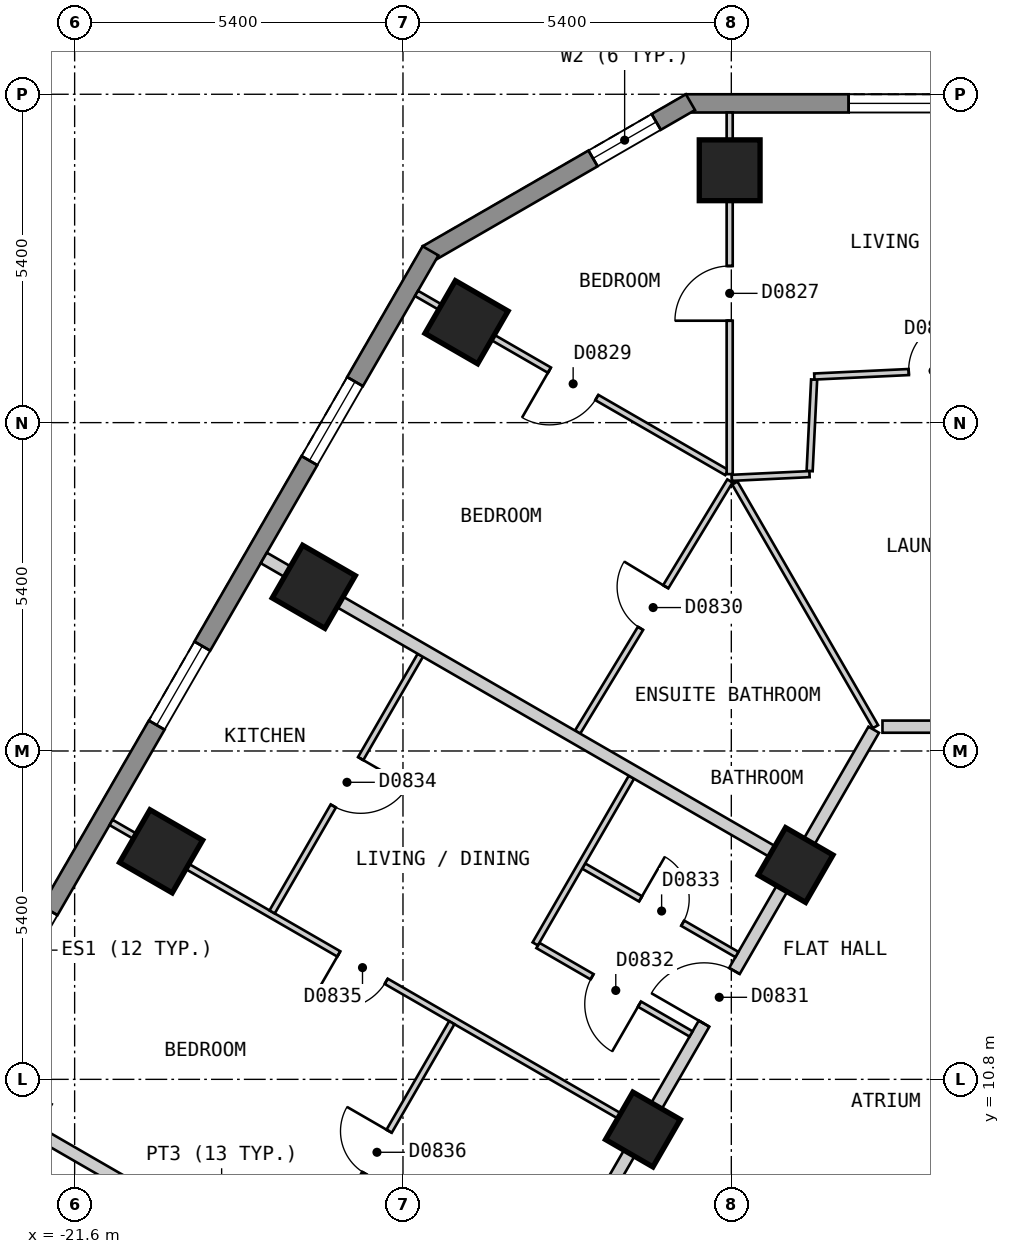
"""IFC4 building model, lengths in metres.
Left out: names, types, materials, properties, quantities, classifications, styles, units other than length and angle.
Written with IfcOpenShell. Run it as: python <this file> out.ifc"""

import sys

from ifc_helpers import new_model, si_unit, direction, frame, frame_2d, origin, origin_2d, place, context, subcontext, project, spatial, polyline, rectangle, outline, extrude, element, fill, save


model = new_model("IFC4")
c1 = context("Model", 3, precision=1e-05, world=origin(), true_north=direction((0.0, 1.0)))
c2 = subcontext(c1, "Body", "Model", "MODEL_VIEW")
j1 = project(units=[si_unit("LENGTHUNIT", "METRE"), si_unit("PLANEANGLEUNIT", "RADIAN")], contexts=[c1])
p1 = place(None, origin())
s1 = spatial("IfcSite", under=j1, at=p1, CompositionType="ELEMENT")
p2 = place(p1, origin())
s2 = spatial("IfcBuilding", under=s1, at=p2, CompositionType="ELEMENT")
p3 = place(p2, frame((0.0, 0.0, 84.0)))
s3 = spatial("IfcBuildingStorey", under=s2, at=p3, CompositionType="ELEMENT", Elevation=84.0)
for number, where, z_axis, x_axis in (
    (1, (-10.827, 25.75, 0.0), (0.0, 0.0, 1.0), (-1.0, 0.0, 0.0)),
    (2, (-15.155, 23.251, 0.0), (0.0, 0.0, 1.0), (-0.5, -0.866, 0.0)),
    (3, (-17.667, 18.9, 0.0), (0.0, 0.0, 1.0), (-0.5, -0.866, 0.0)),
    (4, (-20.178, 14.55, 0.0), (0.0, 0.0, 1.0), (-0.5, -0.866, 0.0)),
):
    element("IfcColumn", number, at=place(p3, frame(where, z_axis=z_axis, x_axis=x_axis)), inside=s3, PredefinedType="COLUMN", context=c2, shape_type="SweptSolid", body=[
        extrude(rectangle(XDim=1.0, YDim=1.0, at=origin_2d()), origin(), (0.0, 0.0, 1.0), 3.0),
    ])
for number, where, z_axis, x_axis in (
    (5, (-9.743, 14.325, 0.0), (0.0, 0.0, 1.0), (-0.5, -0.866, 0.0)),
    (6, (-12.254, 9.975, 0.0), (0.0, 0.0, 1.0), (-0.5, -0.866, 0.0)),
):
    element("IfcColumn", number, at=place(p3, frame(where, z_axis=z_axis, x_axis=x_axis)), inside=s3, PredefinedType="COLUMN", context=c2, shape_type="SweptSolid", body=[
        extrude(rectangle(XDim=0.9, YDim=0.9, at=origin_2d()), origin(), (0.0, 0.0, 1.0), 3.0),
    ])
p4 = place(p3, frame((11.547, 26.85, 0.0), z_axis=(0.0, 0.0, 1.0), x_axis=(-1.0, 0.0, 0.0)))
e7 = element("IfcWall", 7, at=p4, inside=s3, PredefinedType="SOLIDWALL", context=c2, shape_type="SweptSolid", body=[
    extrude(outline(polyline([(0.0, -0.15), (23.094, -0.15), (23.014, 0.15), (0.08, 0.15), (0.0, -0.15)])), origin(), (0.0, 0.0, 1.0), 2.7),
])
p5 = place(p4, frame((2.678, 0.0, 0.15)))
e8 = element("IfcOpeningElement", 8, at=p5, cuts=e7, PredefinedType="OPENING", context=c2, shape_type="SweptSolid", body=[
    extrude(rectangle(XDim=1.5, YDim=2.1, at=frame_2d((0.75, 1.05))), frame((0.0, 0.16, 0.0), z_axis=(0.0, -1.0, 0.0), x_axis=(1.0, 0.0, 0.0)), (0.0, 0.0, 1.0), 0.32),
])
p6 = place(p4, frame((8.092, 0.0, 0.15)))
e9 = element("IfcOpeningElement", 9, at=p6, cuts=e7, PredefinedType="OPENING", context=c2, shape_type="SweptSolid", body=[
    extrude(rectangle(XDim=1.5, YDim=2.1, at=frame_2d((0.75, 1.05))), frame((0.0, 0.16, 0.0), z_axis=(0.0, -1.0, 0.0), x_axis=(1.0, 0.0, 0.0)), (0.0, 0.0, 1.0), 0.32),
])
p7 = place(p4, frame((13.504, 0.0, 0.15)))
e10 = element("IfcOpeningElement", 10, at=p7, cuts=e7, PredefinedType="OPENING", context=c2, shape_type="SweptSolid", body=[
    extrude(rectangle(XDim=1.5, YDim=2.1, at=frame_2d((0.75, 1.05))), frame((0.0, 0.16, 0.0), z_axis=(0.0, -1.0, 0.0), x_axis=(1.0, 0.0, 0.0)), (0.0, 0.0, 1.0), 0.32),
])
p8 = place(p4, frame((18.917, 0.0, 0.15)))
e11 = element("IfcOpeningElement", 11, at=p8, cuts=e7, PredefinedType="OPENING", context=c2, shape_type="SweptSolid", body=[
    extrude(rectangle(XDim=1.5, YDim=2.1, at=frame_2d((0.75, 1.05))), frame((0.0, 0.16, 0.0), z_axis=(0.0, -1.0, 0.0), x_axis=(1.0, 0.0, 0.0)), (0.0, 0.0, 1.0), 0.32),
])
p9 = place(p3, frame((-11.472, 26.87, 0.0), z_axis=(0.0, 0.0, 1.0), x_axis=(-0.866022959057, -0.500004234368, 0.0)))
e12 = element("IfcWall", 12, at=p9, inside=s3, PredefinedType="SOLIDWALL", context=c2, shape_type="SweptSolid", body=[
    extrude(outline(polyline([(0.0, -0.15), (5.0, -0.15), (4.92, 0.15), (0.08, 0.15), (0.0, -0.15)])), origin(), (0.0, 0.0, 1.0), 2.7),
])
p10 = place(p9, frame((0.65, 0.0, 0.15)))
e13 = element("IfcOpeningElement", 13, at=p10, cuts=e12, PredefinedType="OPENING", context=c2, shape_type="SweptSolid", body=[
    extrude(rectangle(XDim=1.2, YDim=2.1, at=frame_2d((0.6, 1.05))), frame((0.0, 0.16, 0.0), z_axis=(0.0, -1.0, 0.0), x_axis=(1.0, 0.0, 0.0)), (0.0, 0.0, 1.0), 0.32),
])
p11 = place(p3, frame((-15.747, 24.425, 0.0), z_axis=(0.0, 0.0, 1.0), x_axis=(-0.500027479704, -0.866009537788, 0.0)))
e14 = element("IfcWall", 14, at=p11, inside=s3, PredefinedType="SOLIDWALL", context=c2, shape_type="SweptSolid", body=[
    extrude(outline(polyline([(0.0, -0.15), (26.559, -0.15), (26.478, 0.15), (0.08, 0.15), (0.0, -0.15)])), origin(), (0.0, 0.0, 1.0), 2.7),
])
p12 = place(p11, frame((2.483, 0.0, 0.15)))
e15 = element("IfcOpeningElement", 15, at=p12, cuts=e14, PredefinedType="OPENING", context=c2, shape_type="SweptSolid", body=[
    extrude(rectangle(XDim=1.5, YDim=2.1, at=frame_2d((0.75, 1.05))), frame((0.0, 0.16, 0.0), z_axis=(0.0, -1.0, 0.0), x_axis=(1.0, 0.0, 0.0)), (0.0, 0.0, 1.0), 0.32),
])
p13 = place(p11, frame((7.506, 0.0, 0.15)))
e16 = element("IfcOpeningElement", 16, at=p13, cuts=e14, PredefinedType="OPENING", context=c2, shape_type="SweptSolid", body=[
    extrude(rectangle(XDim=1.5, YDim=2.1, at=frame_2d((0.75, 1.05))), frame((0.0, 0.16, 0.0), z_axis=(0.0, -1.0, 0.0), x_axis=(1.0, 0.0, 0.0)), (0.0, 0.0, 1.0), 0.32),
])
p14 = place(p11, frame((12.529, 0.0, 0.15)))
e17 = element("IfcOpeningElement", 17, at=p14, cuts=e14, PredefinedType="OPENING", context=c2, shape_type="SweptSolid", body=[
    extrude(rectangle(XDim=1.5, YDim=2.1, at=frame_2d((0.75, 1.05))), frame((0.0, 0.16, 0.0), z_axis=(0.0, -1.0, 0.0), x_axis=(1.0, 0.0, 0.0)), (0.0, 0.0, 1.0), 0.32),
])
p15 = place(p11, frame((17.552, 0.0, 0.15)))
e18 = element("IfcOpeningElement", 18, at=p15, cuts=e14, PredefinedType="OPENING", context=c2, shape_type="SweptSolid", body=[
    extrude(rectangle(XDim=1.5, YDim=2.1, at=frame_2d((0.75, 1.05))), frame((0.0, 0.16, 0.0), z_axis=(0.0, -1.0, 0.0), x_axis=(1.0, 0.0, 0.0)), (0.0, 0.0, 1.0), 0.32),
])
p16 = place(p11, frame((22.575, 0.0, 0.15)))
e19 = element("IfcOpeningElement", 19, at=p16, cuts=e14, PredefinedType="OPENING", context=c2, shape_type="SweptSolid", body=[
    extrude(rectangle(XDim=1.5, YDim=2.1, at=frame_2d((0.75, 1.05))), frame((0.0, 0.16, 0.0), z_axis=(0.0, -1.0, 0.0), x_axis=(1.0, 0.0, 0.0)), (0.0, 0.0, 1.0), 0.32),
])
p17 = place(p3, frame((-8.314, 16.6, 0.0), z_axis=(0.0, 0.0, 1.0), x_axis=(1.0, 0.0, 0.0)))
e20 = element("IfcWall", 20, at=p17, inside=s3, PredefinedType="PARTITIONING", context=c2, shape_type="SweptSolid", body=[
    extrude(rectangle(XDim=2.309, YDim=0.2, at=frame_2d((1.155, 0.0))), origin(), (0.0, 0.0, 1.0), 2.7),
])
p18 = place(p3, frame((-18.562, -0.951, 0.0), z_axis=(0.0, 0.0, 1.0), x_axis=(0.499992962407, 0.866029466902, 0.0)))
e21 = element("IfcWall", 21, at=p18, inside=s3, PredefinedType="PARTITIONING", context=c2, shape_type="SweptSolid", body=[
    extrude(rectangle(XDim=20.208, YDim=0.2, at=frame_2d((10.104, 0.0))), origin(), (0.0, 0.0, 1.0), 2.7),
])
p19 = place(p18, frame((14.627, 0.0, 0.0)))
e22 = element("IfcOpeningElement", 22, at=p19, cuts=e21, PredefinedType="OPENING", context=c2, shape_type="SweptSolid", body=[
    extrude(rectangle(XDim=1.0, YDim=2.1, at=frame_2d((0.5, 1.05))), frame((0.0, 0.11, 0.0), z_axis=(0.0, -1.0, 0.0), x_axis=(1.0, 0.0, 0.0)), (0.0, 0.0, 1.0), 0.22),
])
p20 = place(p18, frame((4.581, 0.0, 0.0)))
e23 = element("IfcOpeningElement", 23, at=p20, cuts=e21, PredefinedType="OPENING", context=c2, shape_type="SweptSolid", body=[
    extrude(rectangle(XDim=1.0, YDim=2.1, at=frame_2d((0.5, 1.05))), frame((0.0, 0.11, 0.0), z_axis=(0.0, -1.0, 0.0), x_axis=(1.0, 0.0, 0.0)), (0.0, 0.0, 1.0), 0.22),
])
p21 = place(p3, frame((-10.742, 20.606, 0.0), z_axis=(0.0, 0.0, 1.0), x_axis=(0.50003312339, -0.866006279142, 0.0)))
e24 = element("IfcWall", 24, at=p21, inside=s3, PredefinedType="PARTITIONING", context=c2, shape_type="SweptSolid", body=[
    extrude(rectangle(XDim=4.626, YDim=0.1, at=frame_2d((2.313, 0.0))), origin(), (0.0, 0.0, 1.0), 2.7),
])
p22 = place(p3, frame((-13.981, 13.002, 0.0), z_axis=(0.0, 0.0, 1.0), x_axis=(0.86595634977, -0.500119585993, 0.0)))
e25 = element("IfcWall", 25, at=p22, inside=s3, PredefinedType="PARTITIONING", context=c2, shape_type="SweptSolid", body=[
    extrude(rectangle(XDim=2.909, YDim=0.1, at=frame_2d((1.455, 0.0))), origin(), (0.0, 0.0, 1.0), 2.7),
])
p23 = place(p22, frame((1.029, 0.0, 0.0)))
e26 = element("IfcOpeningElement", 26, at=p23, cuts=e25, PredefinedType="OPENING", context=c2, shape_type="SweptSolid", body=[
    extrude(rectangle(XDim=0.9, YDim=2.1, at=frame_2d((0.45, 1.05))), frame((0.0, 0.06, 0.0), z_axis=(0.0, -1.0, 0.0), x_axis=(1.0, 0.0, 0.0)), (0.0, 0.0, 1.0), 0.12),
])
p24 = place(p3, frame((-13.228, 14.308, 0.0), z_axis=(0.0, 0.0, 1.0), x_axis=(0.866003949776, -0.500037157592, 0.0)))
e27 = element("IfcWall", 27, at=p24, inside=s3, PredefinedType="PARTITIONING", context=c2, shape_type="SweptSolid", body=[
    extrude(rectangle(XDim=2.91, YDim=0.1, at=frame_2d((1.455, 0.0))), origin(), (0.0, 0.0, 1.0), 2.7),
])
p25 = place(p24, frame((1.08, 0.0, 0.0)))
e28 = element("IfcOpeningElement", 28, at=p25, cuts=e27, PredefinedType="OPENING", context=c2, shape_type="SweptSolid", body=[
    extrude(rectangle(XDim=0.8, YDim=2.1, at=frame_2d((0.4, 1.05))), frame((0.0, 0.06, 0.0), z_axis=(0.0, -1.0, 0.0), x_axis=(1.0, 0.0, 0.0)), (0.0, 0.0, 1.0), 0.12),
])
p26 = place(p3, frame((-15.977, 23.725, 0.0), z_axis=(0.0, 0.0, 1.0), x_axis=(0.866028213039, -0.499995134196, 0.0)))
e29 = element("IfcWall", 29, at=p26, inside=s3, PredefinedType="PARTITIONING", context=c2, shape_type="SweptSolid", body=[
    extrude(rectangle(XDim=5.89, YDim=0.1, at=frame_2d((2.945, 0.0))), origin(), (0.0, 0.0, 1.0), 2.7),
])
p27 = place(p26, frame((2.524, 0.0, 0.0)))
e30 = element("IfcOpeningElement", 30, at=p27, cuts=e29, PredefinedType="OPENING", context=c2, shape_type="SweptSolid", body=[
    extrude(rectangle(XDim=0.9, YDim=2.1, at=frame_2d((0.45, 1.05))), frame((0.0, 0.06, 0.0), z_axis=(0.0, -1.0, 0.0), x_axis=(1.0, 0.0, 0.0)), (0.0, 0.0, 1.0), 0.12),
])
p28 = place(p3, frame((-21.001, 15.025, 0.0), z_axis=(0.0, 0.0, 1.0), x_axis=(0.866016855193, -0.500014806302, 0.0)))
e31 = element("IfcWall", 31, at=p28, inside=s3, PredefinedType="PARTITIONING", context=c2, shape_type="SweptSolid", body=[
    extrude(rectangle(XDim=10.0, YDim=0.1, at=frame_2d((5.0, 0.0))), origin(), (0.0, 0.0, 1.0), 2.7),
])
p29 = place(p28, frame((4.325, 0.0, 0.0)))
e32 = element("IfcOpeningElement", 32, at=p29, cuts=e31, PredefinedType="OPENING", context=c2, shape_type="SweptSolid", body=[
    extrude(rectangle(XDim=0.9, YDim=2.1, at=frame_2d((0.45, 1.05))), frame((0.0, 0.06, 0.0), z_axis=(0.0, -1.0, 0.0), x_axis=(1.0, 0.0, 0.0)), (0.0, 0.0, 1.0), 0.12),
])
p30 = place(p3, frame((-13.328, 16.511, 0.0), z_axis=(0.0, 0.0, 1.0), x_axis=(0.518570528669, 0.855034857065, 0.0)))
e33 = element("IfcWall", 33, at=p30, inside=s3, PredefinedType="PARTITIONING", context=c2, shape_type="SweptSolid", body=[
    extrude(rectangle(XDim=4.83, YDim=0.1, at=frame_2d((2.415, 0.0))), origin(), (0.0, 0.0, 1.0), 2.7),
])
p31 = place(p30, frame((1.995, 0.0, 0.0)))
e34 = element("IfcOpeningElement", 34, at=p31, cuts=e33, PredefinedType="OPENING", context=c2, shape_type="SweptSolid", body=[
    extrude(rectangle(XDim=0.8, YDim=2.1, at=frame_2d((0.4, 1.05))), frame((0.0, 0.06, 0.0), z_axis=(0.0, -1.0, 0.0), x_axis=(1.0, 0.0, 0.0)), (0.0, 0.0, 1.0), 0.12),
])
p32 = place(p3, frame((-14.025, 13.028, 0.0), z_axis=(0.0, 0.0, 1.0), x_axis=(0.499965154568, 0.866045520869, 0.0)))
e35 = element("IfcWall", 35, at=p32, inside=s3, PredefinedType="PARTITIONING", context=c2, shape_type="SweptSolid", body=[
    extrude(rectangle(XDim=3.164, YDim=0.1, at=frame_2d((1.582, 0.0))), origin(), (0.0, 0.0, 1.0), 2.7),
])
p33 = place(p3, frame((-17.834, 7.512, 0.0), z_axis=(0.0, 0.0, 1.0), x_axis=(0.500093956194, 0.865971151354, 0.0)))
e36 = element("IfcWall", 36, at=p33, inside=s3, PredefinedType="PARTITIONING", context=c2, shape_type="SweptSolid", body=[
    extrude(rectangle(XDim=4.873, YDim=0.1, at=frame_2d((2.437, 0.0))), origin(), (0.0, 0.0, 1.0), 2.7),
])
p34 = place(p33, frame((2.012, 0.0, 0.0)))
e37 = element("IfcOpeningElement", 37, at=p34, cuts=e36, PredefinedType="OPENING", context=c2, shape_type="SweptSolid", body=[
    extrude(rectangle(XDim=0.8, YDim=2.1, at=frame_2d((0.4, 1.05))), frame((0.0, 0.06, 0.0), z_axis=(0.0, -1.0, 0.0), x_axis=(1.0, 0.0, 0.0)), (0.0, 0.0, 1.0), 0.12),
])
p35 = place(p3, frame((-18.352, 13.553, 0.0), z_axis=(0.0, 0.0, 1.0), x_axis=(0.500007182864, 0.866021256716, 0.0)))
e38 = element("IfcWall", 38, at=p35, inside=s3, PredefinedType="PARTITIONING", context=c2, shape_type="SweptSolid", body=[
    extrude(rectangle(XDim=4.874, YDim=0.1, at=frame_2d((2.437, 0.0))), origin(), (0.0, 0.0, 1.0), 2.7),
])
p36 = place(p35, frame((2.012, 0.0, 0.0)))
e39 = element("IfcOpeningElement", 39, at=p36, cuts=e38, PredefinedType="OPENING", context=c2, shape_type="SweptSolid", body=[
    extrude(rectangle(XDim=0.9, YDim=2.1, at=frame_2d((0.45, 1.05))), frame((0.0, 0.06, 0.0), z_axis=(0.0, -1.0, 0.0), x_axis=(1.0, 0.0, 0.0)), (0.0, 0.0, 1.0), 0.12),
])
p37 = place(p3, frame((-9.512, 20.803, 0.0), z_axis=(0.0, 0.0, 1.0), x_axis=(0.049089165168, 0.998794400196, 0.0)))
e40 = element("IfcWall", 40, at=p37, inside=s3, PredefinedType="PARTITIONING", context=c2, shape_type="SweptSolid", body=[
    extrude(rectangle(XDim=1.507, YDim=0.1, at=frame_2d((0.753, 0.0))), origin(), (0.0, 0.0, 1.0), 2.7),
])
p38 = place(p3, frame((-10.827, 20.753, 0.0), z_axis=(0.0, 0.0, 1.0), x_axis=(0.0, 1.0, 0.0)))
e41 = element("IfcWall", 41, at=p38, inside=s3, PredefinedType="PARTITIONING", context=c2, shape_type="SweptSolid", body=[
    extrude(rectangle(XDim=5.947, YDim=0.1, at=frame_2d((2.974, 0.0))), origin(), (0.0, 0.0, 1.0), 2.7),
])
p39 = place(p38, frame((2.523, 0.0, 0.0)))
e42 = element("IfcOpeningElement", 42, at=p39, cuts=e41, PredefinedType="OPENING", context=c2, shape_type="SweptSolid", body=[
    extrude(rectangle(XDim=0.9, YDim=2.1, at=frame_2d((0.45, 1.05))), frame((0.0, 0.06, 0.0), z_axis=(0.0, -1.0, 0.0), x_axis=(1.0, 0.0, 0.0)), (0.0, 0.0, 1.0), 0.12),
])
p40 = place(p3, frame((-10.792, 20.692, 0.0), z_axis=(0.0, 0.0, 1.0), x_axis=(0.998861653202, 0.04770112957, 0.0)))
e43 = element("IfcWall", 43, at=p40, inside=s3, PredefinedType="PARTITIONING", context=c2, shape_type="SweptSolid", body=[
    extrude(rectangle(XDim=1.28, YDim=0.1, at=frame_2d((0.64, 0.0))), origin(), (0.0, 0.0, 1.0), 2.7),
])
p41 = place(p3, frame((-9.435, 22.358, 0.0), z_axis=(0.0, 0.0, 1.0), x_axis=(0.998871548472, 0.04749346959, 0.0)))
e44 = element("IfcWall", 44, at=p41, inside=s3, PredefinedType="PARTITIONING", context=c2, shape_type="SweptSolid", body=[
    extrude(rectangle(XDim=4.046, YDim=0.1, at=frame_2d((2.023, 0.0))), origin(), (0.0, 0.0, 1.0), 2.7),
])
p42 = place(p41, frame((1.555, 0.0, 0.0)))
e45 = element("IfcOpeningElement", 45, at=p42, cuts=e44, PredefinedType="OPENING", context=c2, shape_type="SweptSolid", body=[
    extrude(rectangle(XDim=0.8, YDim=2.1, at=frame_2d((0.4, 1.05))), frame((0.0, 0.06, 0.0), z_axis=(0.0, -1.0, 0.0), x_axis=(1.0, 0.0, 0.0)), (0.0, 0.0, 1.0), 0.12),
])
p43 = place(p3, frame((-23.513, 10.675, 0.0), z_axis=(0.0, 0.0, 1.0), x_axis=(0.866041268327, -0.499972520799, 0.0)))
e46 = element("IfcWall", 46, at=p43, inside=s3, PredefinedType="PARTITIONING", context=c2, shape_type="SweptSolid", body=[
    extrude(rectangle(XDim=10.0, YDim=0.2, at=frame_2d((5.0, 0.0))), origin(), (0.0, 0.0, 1.0), 2.7),
])
p44 = place(p3, frame((-18.489, 19.375, 0.0), z_axis=(0.0, 0.0, 1.0), x_axis=(0.866016855193, -0.500014806302, 0.0)))
e47 = element("IfcWall", 47, at=p44, inside=s3, PredefinedType="PARTITIONING", context=c2, shape_type="SweptSolid", body=[
    extrude(rectangle(XDim=10.0, YDim=0.2, at=frame_2d((5.0, 0.0))), origin(), (0.0, 0.0, 1.0), 2.7),
])
p45 = place(p8, origin())
e48 = element("IfcWindow", 48, at=p45, inside=s3, PartitioningType="SINGLE_PANEL", PredefinedType="WINDOW", context=c2, shape_type="SweptSolid", body=[
    extrude(rectangle(XDim=1.5, YDim=2.1, at=frame_2d((0.75, 1.05))), frame((0.0, 0.03, 0.0), z_axis=(0.0, -1.0, 0.0), x_axis=(1.0, 0.0, 0.0)), (0.0, 0.0, 1.0), 0.06),
])
fill(e11, e48)
p46 = place(p10, origin())
e49 = element("IfcWindow", 49, at=p46, inside=s3, PartitioningType="SINGLE_PANEL", PredefinedType="WINDOW", context=c2, shape_type="SweptSolid", body=[
    extrude(rectangle(XDim=1.2, YDim=2.1, at=frame_2d((0.6, 1.05))), frame((0.0, 0.03, 0.0), z_axis=(0.0, -1.0, 0.0), x_axis=(1.0, 0.0, 0.0)), (0.0, 0.0, 1.0), 0.06),
])
fill(e13, e49)
p47 = place(p12, origin())
e50 = element("IfcWindow", 50, at=p47, inside=s3, PartitioningType="SINGLE_PANEL", PredefinedType="WINDOW", context=c2, shape_type="SweptSolid", body=[
    extrude(rectangle(XDim=1.5, YDim=2.1, at=frame_2d((0.75, 1.05))), frame((0.0, 0.03, 0.0), z_axis=(0.0, -1.0, 0.0), x_axis=(1.0, 0.0, 0.0)), (0.0, 0.0, 1.0), 0.06),
])
fill(e15, e50)
p48 = place(p13, origin())
e51 = element("IfcWindow", 51, at=p48, inside=s3, PartitioningType="SINGLE_PANEL", PredefinedType="WINDOW", context=c2, shape_type="SweptSolid", body=[
    extrude(rectangle(XDim=1.5, YDim=2.1, at=frame_2d((0.75, 1.05))), frame((0.0, 0.03, 0.0), z_axis=(0.0, -1.0, 0.0), x_axis=(1.0, 0.0, 0.0)), (0.0, 0.0, 1.0), 0.06),
])
fill(e16, e51)
p49 = place(p39, origin())
e52 = element("IfcDoor", 52, at=p49, inside=s3, OperationType="SINGLE_SWING_LEFT", PredefinedType="DOOR", context=c2, shape_type="SweptSolid", body=[
    extrude(rectangle(XDim=0.9, YDim=2.1, at=frame_2d((0.45, 1.05))), frame((0.0, 0.025, 0.0), z_axis=(0.0, -1.0, 0.0), x_axis=(1.0, 0.0, 0.0)), (0.0, 0.0, 1.0), 0.05),
])
fill(e42, e52)
p50 = place(p42, origin())
e53 = element("IfcDoor", 53, at=p50, inside=s3, OperationType="SINGLE_SWING_RIGHT", PredefinedType="DOOR", context=c2, shape_type="SweptSolid", body=[
    extrude(rectangle(XDim=0.8, YDim=2.1, at=frame_2d((0.4, 1.05))), frame((0.0, 0.025, 0.0), z_axis=(0.0, -1.0, 0.0), x_axis=(1.0, 0.0, 0.0)), (0.0, 0.0, 1.0), 0.05),
])
fill(e45, e53)
p51 = place(p27, origin())
e54 = element("IfcDoor", 54, at=p51, inside=s3, OperationType="SINGLE_SWING_LEFT", PredefinedType="DOOR", context=c2, shape_type="SweptSolid", body=[
    extrude(rectangle(XDim=0.9, YDim=2.1, at=frame_2d((0.45, 1.05))), frame((0.0, 0.025, 0.0), z_axis=(0.0, -1.0, 0.0), x_axis=(1.0, 0.0, 0.0)), (0.0, 0.0, 1.0), 0.05),
])
fill(e30, e54)
p52 = place(p31, origin())
e55 = element("IfcDoor", 55, at=p52, inside=s3, OperationType="SINGLE_SWING_RIGHT", PredefinedType="DOOR", context=c2, shape_type="SweptSolid", body=[
    extrude(rectangle(XDim=0.8, YDim=2.1, at=frame_2d((0.4, 1.05))), frame((0.0, 0.025, 0.0), z_axis=(0.0, -1.0, 0.0), x_axis=(1.0, 0.0, 0.0)), (0.0, 0.0, 1.0), 0.05),
])
fill(e34, e55)
p53 = place(p19, origin())
e56 = element("IfcDoor", 56, at=p53, inside=s3, OperationType="SINGLE_SWING_LEFT", PredefinedType="DOOR", context=c2, shape_type="SweptSolid", body=[
    extrude(rectangle(XDim=1.0, YDim=2.1, at=frame_2d((0.5, 1.05))), frame((0.0, 0.025, 0.0), z_axis=(0.0, -1.0, 0.0), x_axis=(1.0, 0.0, 0.0)), (0.0, 0.0, 1.0), 0.05),
])
fill(e22, e56)
p54 = place(p23, origin())
e57 = element("IfcDoor", 57, at=p54, inside=s3, OperationType="SINGLE_SWING_RIGHT", PredefinedType="DOOR", context=c2, shape_type="SweptSolid", body=[
    extrude(rectangle(XDim=0.9, YDim=2.1, at=frame_2d((0.45, 1.05))), frame((0.0, 0.025, 0.0), z_axis=(0.0, -1.0, 0.0), x_axis=(1.0, 0.0, 0.0)), (0.0, 0.0, 1.0), 0.05),
])
fill(e26, e57)
p55 = place(p25, origin())
e58 = element("IfcDoor", 58, at=p55, inside=s3, OperationType="SINGLE_SWING_LEFT", PredefinedType="DOOR", context=c2, shape_type="SweptSolid", body=[
    extrude(rectangle(XDim=0.8, YDim=2.1, at=frame_2d((0.4, 1.05))), frame((0.0, 0.025, 0.0), z_axis=(0.0, -1.0, 0.0), x_axis=(1.0, 0.0, 0.0)), (0.0, 0.0, 1.0), 0.05),
])
fill(e28, e58)
p56 = place(p36, origin())
e59 = element("IfcDoor", 59, at=p56, inside=s3, OperationType="SINGLE_SWING_RIGHT", PredefinedType="DOOR", context=c2, shape_type="SweptSolid", body=[
    extrude(rectangle(XDim=0.9, YDim=2.1, at=frame_2d((0.45, 1.05))), frame((0.0, 0.025, 0.0), z_axis=(0.0, -1.0, 0.0), x_axis=(1.0, 0.0, 0.0)), (0.0, 0.0, 1.0), 0.05),
])
fill(e39, e59)
p57 = place(p29, origin())
e60 = element("IfcDoor", 60, at=p57, inside=s3, OperationType="SINGLE_SWING_LEFT", PredefinedType="DOOR", context=c2, shape_type="SweptSolid", body=[
    extrude(rectangle(XDim=0.9, YDim=2.1, at=frame_2d((0.45, 1.05))), frame((0.0, 0.025, 0.0), z_axis=(0.0, -1.0, 0.0), x_axis=(1.0, 0.0, 0.0)), (0.0, 0.0, 1.0), 0.05),
])
fill(e32, e60)
p58 = place(p34, origin())
e61 = element("IfcDoor", 61, at=p58, inside=s3, OperationType="SINGLE_SWING_RIGHT", PredefinedType="DOOR", context=c2, shape_type="SweptSolid", body=[
    extrude(rectangle(XDim=0.8, YDim=2.1, at=frame_2d((0.4, 1.05))), frame((0.0, 0.025, 0.0), z_axis=(0.0, -1.0, 0.0), x_axis=(1.0, 0.0, 0.0)), (0.0, 0.0, 1.0), 0.05),
])
fill(e37, e61)
save(model, sys.argv[1])
